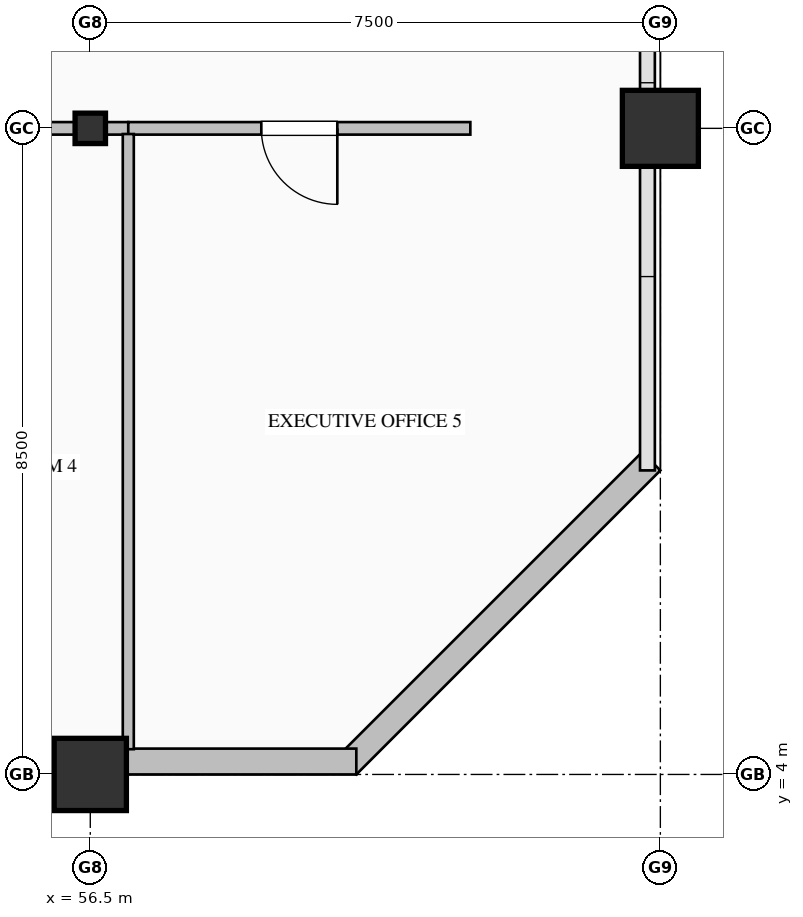
"""IFC4 building model, lengths in metres.
Left out: names, types, materials, properties, quantities, classifications, styles, units other than length and angle.
Written with IfcOpenShell. Run it as: python <this file> out.ifc"""

import sys

from ifc_helpers import new_model, si_unit, direction, frame, frame_2d, origin, origin_2d, place, context, subcontext, project, spatial, rectangle, hollow_rectangle, hollow_circle, i_section, extrude, element, fill, save


model = new_model("IFC4")
c1 = context("Model", 3, precision=1e-05, world=origin(), true_north=direction((0.0, 1.0)))
c2 = subcontext(c1, "Body", "Model", "MODEL_VIEW")
j1 = project(units=[si_unit("LENGTHUNIT", "METRE"), si_unit("PLANEANGLEUNIT", "RADIAN")], contexts=[c1])
p1 = place(None, origin())
s1 = spatial("IfcSite", under=j1, at=p1, CompositionType="ELEMENT")
p2 = place(p1, origin())
s2 = spatial("IfcBuilding", under=s1, at=p2, CompositionType="ELEMENT")
p3 = place(p2, frame((0.0, 0.0, 119.0)))
s3 = spatial("IfcBuildingStorey", under=s2, at=p3, CompositionType="ELEMENT", Elevation=119.0)
p4 = place(p3, frame((56.5, 4.0, 0.0), z_axis=(0.0, 0.0, 1.0), x_axis=(1.0, 0.0, 0.0)))
e1 = element("IfcColumn", 1, at=p4, inside=s3, PredefinedType="COLUMN", context=c2, shape_type="SweptSolid", body=[
    extrude(hollow_rectangle(XDim=0.95, YDim=0.95, WallThickness=0.036, at=origin_2d()), origin(), (0.0, 0.0, 1.0), 4.0),
])
p5 = place(p3, frame((56.5, 12.5, 0.0), z_axis=(0.0, 0.0, 1.0), x_axis=(1.0, 0.0, 0.0)))
e2 = element("IfcColumn", 2, at=p5, inside=s3, PredefinedType="COLUMN", context=c2, shape_type="SweptSolid", body=[
    extrude(i_section(OverallWidth=0.4, OverallDepth=0.4, WebThickness=0.013, FlangeThickness=0.021, FilletRadius=0.022, at=origin_2d()), origin(), (0.0, 0.0, 1.0), 4.0),
])
p6 = place(p3, frame((64.0, 12.5, 0.0), z_axis=(0.0, 0.0, 1.0), x_axis=(1.0, 0.0, 0.0)))
e3 = element("IfcColumn", 3, at=p6, inside=s3, PredefinedType="COLUMN", context=c2, shape_type="SweptSolid", body=[
    extrude(hollow_circle(Radius=0.5, WallThickness=0.036, at=origin_2d()), origin(), (0.0, 0.0, 1.0), 4.0),
])
p7 = place(p3, frame((63.88, 8.12, 0.0), z_axis=(0.0, 0.0, 1.0), x_axis=(-0.707106781187, -0.707106781187, 0.0)))
e4 = element("IfcWall", 4, at=p7, inside=s3, PredefinedType="SOLIDWALL", context=c2, shape_type="SweptSolid", body=[
    extrude(rectangle(XDim=5.657, YDim=0.34, at=frame_2d((2.828, 0.0))), origin(), (0.0, 0.0, 1.0), 3.765),
])
p8 = place(p3, frame((60.0, 4.17, 0.0), z_axis=(0.0, 0.0, 1.0), x_axis=(-1.0, 0.0, 0.0)))
e5 = element("IfcWall", 5, at=p8, inside=s3, PredefinedType="SOLIDWALL", context=c2, shape_type="SweptSolid", body=[
    extrude(rectangle(XDim=15.5, YDim=0.34, at=frame_2d((7.75, 0.0))), origin(), (0.0, 0.0, 1.0), 3.265),
])
p9 = place(p3, frame((57.0, 12.5, 0.0), z_axis=(0.0, 0.0, 1.0), x_axis=(-1.0, 0.0, 0.0)))
e6 = element("IfcWall", 6, at=p9, inside=s3, PredefinedType="PARTITIONING", context=c2, shape_type="SweptSolid", body=[
    extrude(rectangle(XDim=3.5, YDim=0.165, at=frame_2d((1.75, 0.0))), origin(), (0.0, 0.0, 1.0), 3.157),
])
p10 = place(p9, frame((1.2, 0.0, 0.0)))
e7 = element("IfcOpeningElement", 7, at=p10, cuts=e6, PredefinedType="OPENING", context=c2, shape_type="SweptSolid", body=[
    extrude(rectangle(XDim=1.1, YDim=2.2, at=frame_2d((0.55, 1.1))), frame((0.0, 0.093, 0.0), z_axis=(0.0, -1.0, 0.0), x_axis=(1.0, 0.0, 0.0)), (0.0, 0.0, 1.0), 0.185),
])
p11 = place(p3, frame((61.5, 12.5, 0.0), z_axis=(0.0, 0.0, 1.0), x_axis=(-1.0, 0.0, 0.0)))
e8 = element("IfcWall", 8, at=p11, inside=s3, PredefinedType="PARTITIONING", context=c2, shape_type="SweptSolid", body=[
    extrude(rectangle(XDim=4.5, YDim=0.165, at=frame_2d((2.25, 0.0))), origin(), (0.0, 0.0, 1.0), 3.157),
])
p12 = place(p11, frame((1.75, 0.0, 0.0)))
e9 = element("IfcOpeningElement", 9, at=p12, cuts=e8, PredefinedType="OPENING", context=c2, shape_type="SweptSolid", body=[
    extrude(rectangle(XDim=1.0, YDim=2.15, at=frame_2d((0.5, 1.075))), frame((0.0, 0.093, 0.0), z_axis=(0.0, -1.0, 0.0), x_axis=(1.0, 0.0, 0.0)), (0.0, 0.0, 1.0), 0.185),
])
p13 = place(p3, frame((57.0, 12.426, 0.0), z_axis=(0.0, 0.0, 1.0), x_axis=(0.0, -1.0, 0.0)))
e10 = element("IfcWall", 10, at=p13, inside=s3, PredefinedType="PARTITIONING", context=c2, shape_type="SweptSolid", body=[
    extrude(rectangle(XDim=8.094, YDim=0.145, at=frame_2d((4.047, 0.0))), origin(), (0.0, 0.0, 1.0), 3.765),
])
p14 = place(p12, origin())
e11 = element("IfcDoor", 11, at=p14, inside=s3, OperationType="SINGLE_SWING_LEFT", PredefinedType="DOOR", context=c2, shape_type="SweptSolid", body=[
    extrude(rectangle(XDim=1.0, YDim=2.15, at=frame_2d((0.5, 1.075))), frame((0.0, 0.025, 0.0), z_axis=(0.0, -1.0, 0.0), x_axis=(1.0, 0.0, 0.0)), (0.0, 0.0, 1.0), 0.05),
])
fill(e9, e11)
save(model, sys.argv[1])
